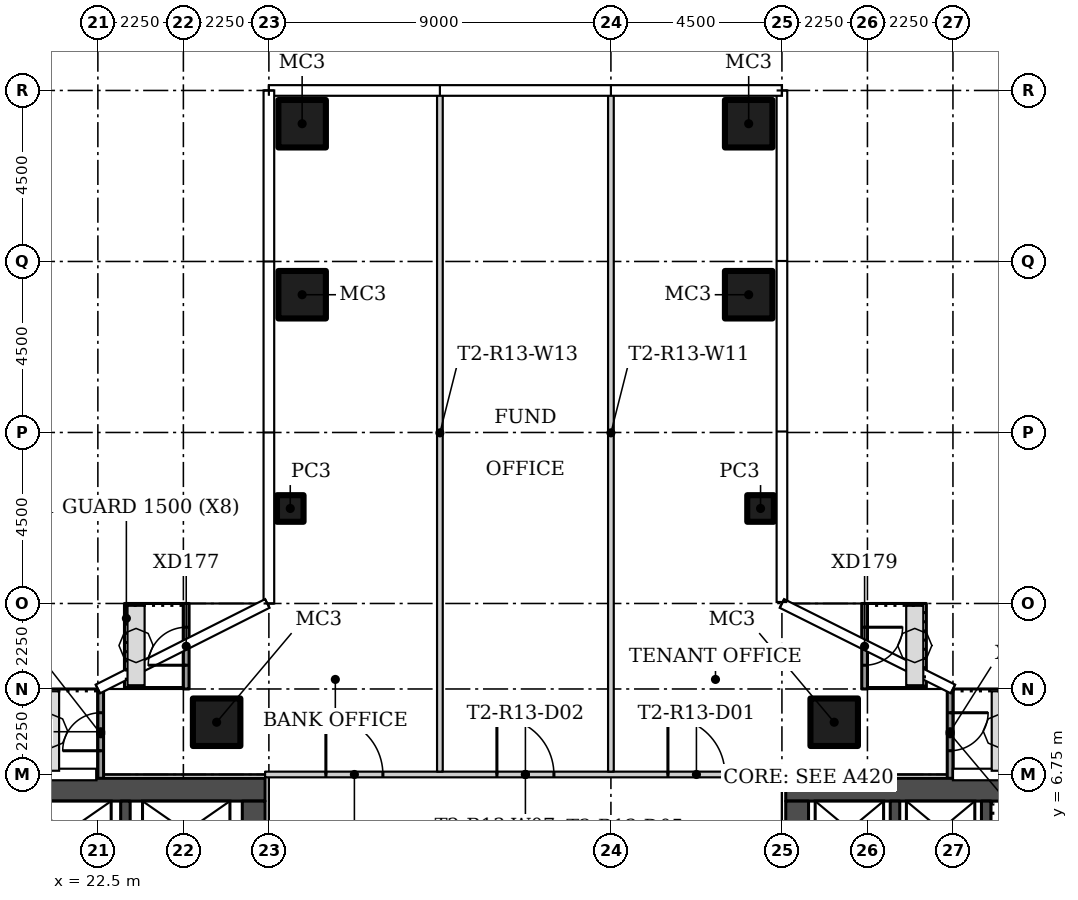
"""IFC4 building model, lengths in metres.
Left out: names, types, materials, properties, quantities, classifications, styles, units other than length and angle.
Written with IfcOpenShell. Run it as: python <this file> out.ifc"""

import sys

from ifc_helpers import new_model, si_unit, direction, frame, frame_2d, origin, origin_2d, place, context, subcontext, project, spatial, rectangle, hollow_rectangle, extrude, element, fill, save


model = new_model("IFC4")
c1 = context("Model", 3, precision=1e-05, world=origin(), true_north=direction((0.0, 1.0)))
c2 = subcontext(c1, "Body", "Model", "MODEL_VIEW")
j1 = project(units=[si_unit("LENGTHUNIT", "METRE"), si_unit("PLANEANGLEUNIT", "RADIAN")], contexts=[c1])
p1 = place(None, origin())
s1 = spatial("IfcSite", under=j1, at=p1, CompositionType="ELEMENT")
p2 = place(p1, origin())
s2 = spatial("IfcBuilding", under=s1, at=p2, CompositionType="ELEMENT")
p3 = place(p2, frame((0.0, 0.0, 120.9)))
s3 = spatial("IfcBuildingStorey", under=s2, at=p3, CompositionType="ELEMENT", Elevation=120.9)
for number, where in (
    (1, (25.625, 8.125, 0.0)),
    (2, (41.875, 8.125, 0.0)),
):
    element("IfcColumn", number, at=place(p3, frame(where)), inside=s3, PredefinedType="COLUMN", context=c2, shape_type="SweptSolid", body=[
        extrude(hollow_rectangle(XDim=1.25, YDim=1.25, WallThickness=0.05, at=origin_2d()), origin(), (0.0, 0.0, 1.0), 3.55),
    ])
p4 = place(p3, frame((39.938, 13.75, 0.0)))
e3 = element("IfcColumn", 3, at=p4, inside=s3, PredefinedType="COLUMN", context=c2, shape_type="SweptSolid", body=[
    extrude(hollow_rectangle(XDim=0.7, YDim=0.7, WallThickness=0.025, at=origin_2d()), origin(), (0.0, 0.0, 1.0), 3.55),
])
for number, where in (
    (4, (39.625, 19.375, 0.0)),
    (5, (39.625, 23.875, 0.0)),
):
    element("IfcColumn", number, at=place(p3, frame(where)), inside=s3, PredefinedType="COLUMN", context=c2, shape_type="SweptSolid", body=[
        extrude(hollow_rectangle(XDim=1.25, YDim=1.25, WallThickness=0.05, at=origin_2d()), origin(), (0.0, 0.0, 1.0), 3.55),
    ])
p5 = place(p3, frame((27.562, 13.75, 0.0)))
e6 = element("IfcColumn", 6, at=p5, inside=s3, PredefinedType="COLUMN", context=c2, shape_type="SweptSolid", body=[
    extrude(hollow_rectangle(XDim=0.7, YDim=0.7, WallThickness=0.025, at=origin_2d()), origin(), (0.0, 0.0, 1.0), 3.55),
])
for number, where in (
    (7, (27.875, 19.375, 0.0)),
    (8, (27.875, 23.875, 0.0)),
):
    element("IfcColumn", number, at=place(p3, frame(where)), inside=s3, PredefinedType="COLUMN", context=c2, shape_type="SweptSolid", body=[
        extrude(hollow_rectangle(XDim=1.25, YDim=1.25, WallThickness=0.05, at=origin_2d()), origin(), (0.0, 0.0, 1.0), 3.55),
    ])
p6 = place(p3, frame((26.9, 6.75, 0.0)))
e9 = element("IfcWall", 9, at=p6, inside=s3, PredefinedType="PARTITIONING", context=c2, shape_type="SweptSolid", body=[
    extrude(rectangle(XDim=13.7, YDim=0.15, at=frame_2d((6.85, 0.0))), origin(), (0.0, 0.0, 1.0), 3.55),
])
p7 = place(p6, frame((10.6, 0.0, 0.0)))
e10 = element("IfcOpeningElement", 10, at=p7, cuts=e9, PredefinedType="OPENING", context=c2, shape_type="SweptSolid", body=[
    extrude(rectangle(XDim=1.5, YDim=2.1, at=frame_2d((0.75, 1.05))), frame((0.0, 0.085, 0.0), z_axis=(0.0, -1.0, 0.0), x_axis=(1.0, 0.0, 0.0)), (0.0, 0.0, 1.0), 0.17),
])
p8 = place(p6, frame((6.1, 0.0, 0.0)))
e11 = element("IfcOpeningElement", 11, at=p8, cuts=e9, PredefinedType="OPENING", context=c2, shape_type="SweptSolid", body=[
    extrude(rectangle(XDim=1.5, YDim=2.1, at=frame_2d((0.75, 1.05))), frame((0.0, 0.085, 0.0), z_axis=(0.0, -1.0, 0.0), x_axis=(1.0, 0.0, 0.0)), (0.0, 0.0, 1.0), 0.17),
])
p9 = place(p6, frame((1.6, 0.0, 0.0)))
e12 = element("IfcOpeningElement", 12, at=p9, cuts=e9, PredefinedType="OPENING", context=c2, shape_type="SweptSolid", body=[
    extrude(rectangle(XDim=1.5, YDim=2.1, at=frame_2d((0.75, 1.05))), frame((0.0, 0.085, 0.0), z_axis=(0.0, -1.0, 0.0), x_axis=(1.0, 0.0, 0.0)), (0.0, 0.0, 1.0), 0.17),
])
for number, where, z_axis, x_axis in (
    (13, (36.0, 24.655, 0.0), (0.0, 0.0, 1.0), (0.0, -1.0, 0.0)),
    (14, (31.5, 24.655, 0.0), (0.0, 0.0, 1.0), (0.0, -1.0, 0.0)),
):
    element("IfcWall", number, at=place(p3, frame(where, z_axis=z_axis, x_axis=x_axis)), inside=s3, PredefinedType="PARTITIONING", context=c2, shape_type="SweptSolid", body=[
        extrude(rectangle(XDim=17.83, YDim=0.15, at=frame_2d((8.915, 0.0))), origin(), (0.0, 0.0, 1.0), 3.55),
    ])
p10 = place(p3, frame((24.825, 9.0, 0.0), z_axis=(0.0, 0.0, 1.0), x_axis=(0.0, 1.0, 0.0)))
e15 = element("IfcWall", 15, at=p10, inside=s3, PredefinedType="SOLIDWALL", context=c2, shape_type="SweptSolid", body=[
    extrude(rectangle(XDim=2.25, YDim=0.15, at=frame_2d((1.125, 0.0))), origin(), (0.0, 0.0, 1.0), 3.45),
])
p11 = place(p10, frame((0.625, 0.0, 0.0)))
e16 = element("IfcOpeningElement", 16, at=p11, cuts=e15, PredefinedType="OPENING", context=c2, shape_type="SweptSolid", body=[
    extrude(rectangle(XDim=1.0, YDim=2.4, at=frame_2d((0.5, 1.2))), frame((0.0, 0.085, 0.0), z_axis=(0.0, -1.0, 0.0), x_axis=(1.0, 0.0, 0.0)), (0.0, 0.0, 1.0), 0.17),
])
p12 = place(p3, frame((22.575, 6.643, 0.0), z_axis=(0.0, 0.0, 1.0), x_axis=(0.0, 1.0, 0.0)))
e17 = element("IfcWall", 17, at=p12, inside=s3, PredefinedType="SOLIDWALL", context=c2, shape_type="SweptSolid", body=[
    extrude(rectangle(XDim=2.357, YDim=0.15, at=frame_2d((1.178, 0.0))), origin(), (0.0, 0.0, 1.0), 3.45),
])
p13 = place(p12, frame((0.732, 0.0, 0.0)))
e18 = element("IfcOpeningElement", 18, at=p13, cuts=e17, PredefinedType="OPENING", context=c2, shape_type="SweptSolid", body=[
    extrude(rectangle(XDim=1.0, YDim=2.4, at=frame_2d((0.5, 1.2))), frame((0.0, 0.085, 0.0), z_axis=(0.0, -1.0, 0.0), x_axis=(1.0, 0.0, 0.0)), (0.0, 0.0, 1.0), 0.17),
])
p14 = place(p3, frame((42.675, 11.25, 0.0), z_axis=(0.0, 0.0, 1.0), x_axis=(0.0, -1.0, 0.0)))
e19 = element("IfcWall", 19, at=p14, inside=s3, PredefinedType="SOLIDWALL", context=c2, shape_type="SweptSolid", body=[
    extrude(rectangle(XDim=2.25, YDim=0.15, at=frame_2d((1.125, 0.0))), origin(), (0.0, 0.0, 1.0), 3.45),
])
p15 = place(p14, frame((0.625, 0.0, 0.0)))
e20 = element("IfcOpeningElement", 20, at=p15, cuts=e19, PredefinedType="OPENING", context=c2, shape_type="SweptSolid", body=[
    extrude(rectangle(XDim=1.0, YDim=2.4, at=frame_2d((0.5, 1.2))), frame((0.0, 0.085, 0.0), z_axis=(0.0, -1.0, 0.0), x_axis=(1.0, 0.0, 0.0)), (0.0, 0.0, 1.0), 0.17),
])
p16 = place(p3, frame((44.925, 9.0, 0.0), z_axis=(0.0, 0.0, 1.0), x_axis=(0.0, -1.0, 0.0)))
e21 = element("IfcWall", 21, at=p16, inside=s3, PredefinedType="SOLIDWALL", context=c2, shape_type="SweptSolid", body=[
    extrude(rectangle(XDim=2.357, YDim=0.15, at=frame_2d((1.178, 0.0))), origin(), (0.0, 0.0, 1.0), 3.45),
])
p17 = place(p16, frame((0.625, 0.0, 0.0)))
e22 = element("IfcOpeningElement", 22, at=p17, cuts=e21, PredefinedType="OPENING", context=c2, shape_type="SweptSolid", body=[
    extrude(rectangle(XDim=1.0, YDim=2.4, at=frame_2d((0.5, 1.2))), frame((0.0, 0.085, 0.0), z_axis=(0.0, -1.0, 0.0), x_axis=(1.0, 0.0, 0.0)), (0.0, 0.0, 1.0), 0.17),
])
p18 = place(p3, frame((13.6, 6.35, 0.0)))
e23 = element("IfcWall", 23, at=p18, inside=s3, PredefinedType="SHEAR", context=c2, shape_type="SweptSolid", body=[
    extrude(rectangle(XDim=13.3, YDim=0.6, at=frame_2d((6.65, 0.0))), origin(), (0.0, 0.0, 1.0), 3.55),
])
p19 = place(p3, frame((26.6, 6.05, 0.0), z_axis=(0.0, 0.0, 1.0), x_axis=(0.0, -1.0, 0.0)))
e24 = element("IfcWall", 24, at=p19, inside=s3, PredefinedType="SHEAR", context=c2, shape_type="SweptSolid", body=[
    extrude(rectangle(XDim=12.1, YDim=0.6, at=frame_2d((6.05, 0.0))), origin(), (0.0, 0.0, 1.0), 3.55),
])
p20 = place(p19, frame((10.1, 0.0, 0.0)))
e25 = element("IfcOpeningElement", 25, at=p20, cuts=e24, PredefinedType="OPENING", context=c2, shape_type="SweptSolid", body=[
    extrude(rectangle(XDim=1.2, YDim=2.1, at=frame_2d((0.6, 1.05))), frame((0.0, 0.31, 0.0), z_axis=(0.0, -1.0, 0.0), x_axis=(1.0, 0.0, 0.0)), (0.0, 0.0, 1.0), 0.62),
])
p21 = place(p19, frame((3.9, 0.0, 0.0)))
e26 = element("IfcOpeningElement", 26, at=p21, cuts=e24, PredefinedType="OPENING", context=c2, shape_type="SweptSolid", body=[
    extrude(rectangle(XDim=1.8, YDim=2.4, at=frame_2d((0.9, 1.2))), frame((0.0, 0.31, 0.0), z_axis=(0.0, -1.0, 0.0), x_axis=(1.0, 0.0, 0.0)), (0.0, 0.0, 1.0), 0.62),
])
p22 = place(p3, frame((23.225, 3.25, 0.0), z_axis=(0.0, 0.0, 1.0), x_axis=(0.0, 1.0, 0.0)))
e27 = element("IfcWall", 27, at=p22, inside=s3, PredefinedType="SHEAR", context=c2, shape_type="SweptSolid", body=[
    extrude(rectangle(XDim=2.8, YDim=0.25, at=frame_2d((1.4, 0.0))), origin(), (0.0, 0.0, 1.0), 3.55),
])
p23 = place(p3, frame((53.9, 6.35, 0.0), z_axis=(0.0, 0.0, 1.0), x_axis=(-1.0, 0.0, 0.0)))
e28 = element("IfcWall", 28, at=p23, inside=s3, PredefinedType="SHEAR", context=c2, shape_type="SweptSolid", body=[
    extrude(rectangle(XDim=13.3, YDim=0.6, at=frame_2d((6.65, 0.0))), origin(), (0.0, 0.0, 1.0), 3.55),
])
p24 = place(p3, frame((40.9, -6.05, 0.0), z_axis=(0.0, 0.0, 1.0), x_axis=(0.0, 1.0, 0.0)))
e29 = element("IfcWall", 29, at=p24, inside=s3, PredefinedType="SHEAR", context=c2, shape_type="SweptSolid", body=[
    extrude(rectangle(XDim=12.1, YDim=0.6, at=frame_2d((6.05, 0.0))), origin(), (0.0, 0.0, 1.0), 3.55),
])
p25 = place(p24, frame((0.8, 0.0, 0.0)))
e30 = element("IfcOpeningElement", 30, at=p25, cuts=e29, PredefinedType="OPENING", context=c2, shape_type="SweptSolid", body=[
    extrude(rectangle(XDim=1.2, YDim=2.1, at=frame_2d((0.6, 1.05))), frame((0.0, 0.31, 0.0), z_axis=(0.0, -1.0, 0.0), x_axis=(1.0, 0.0, 0.0)), (0.0, 0.0, 1.0), 0.62),
])
p26 = place(p24, frame((6.4, 0.0, 0.0)))
e31 = element("IfcOpeningElement", 31, at=p26, cuts=e29, PredefinedType="OPENING", context=c2, shape_type="SweptSolid", body=[
    extrude(rectangle(XDim=1.8, YDim=2.4, at=frame_2d((0.9, 1.2))), frame((0.0, 0.31, 0.0), z_axis=(0.0, -1.0, 0.0), x_axis=(1.0, 0.0, 0.0)), (0.0, 0.0, 1.0), 0.62),
])
for number, where, z_axis, x_axis in (
    (32, (45.875, 3.25, 0.0), (0.0, 0.0, 1.0), (0.0, 1.0, 0.0)),
    (33, (43.475, 3.25, 0.0), (0.0, 0.0, 1.0), (0.0, 1.0, 0.0)),
):
    element("IfcWall", number, at=place(p3, frame(where, z_axis=z_axis, x_axis=x_axis)), inside=s3, PredefinedType="SHEAR", context=c2, shape_type="SweptSolid", body=[
        extrude(rectangle(XDim=2.8, YDim=0.25, at=frame_2d((1.4, 0.0))), origin(), (0.0, 0.0, 1.0), 3.55),
    ])
p27 = place(p7, origin())
e34 = element("IfcDoor", 34, at=p27, inside=s3, OperationType="DOUBLE_DOOR_SINGLE_SWING", PredefinedType="DOOR", context=c2, shape_type="SweptSolid", body=[
    extrude(rectangle(XDim=1.5, YDim=2.1, at=frame_2d((0.75, 1.05))), frame((0.0, 0.025, 0.0), z_axis=(0.0, -1.0, 0.0), x_axis=(1.0, 0.0, 0.0)), (0.0, 0.0, 1.0), 0.05),
])
fill(e10, e34)
p28 = place(p8, origin())
e35 = element("IfcDoor", 35, at=p28, inside=s3, OperationType="DOUBLE_DOOR_SINGLE_SWING", PredefinedType="DOOR", context=c2, shape_type="SweptSolid", body=[
    extrude(rectangle(XDim=1.5, YDim=2.1, at=frame_2d((0.75, 1.05))), frame((0.0, 0.025, 0.0), z_axis=(0.0, -1.0, 0.0), x_axis=(1.0, 0.0, 0.0)), (0.0, 0.0, 1.0), 0.05),
])
fill(e11, e35)
p29 = place(p9, origin())
e36 = element("IfcDoor", 36, at=p29, inside=s3, OperationType="DOUBLE_DOOR_SINGLE_SWING", PredefinedType="DOOR", context=c2, shape_type="SweptSolid", body=[
    extrude(rectangle(XDim=1.5, YDim=2.1, at=frame_2d((0.75, 1.05))), frame((0.0, 0.025, 0.0), z_axis=(0.0, -1.0, 0.0), x_axis=(1.0, 0.0, 0.0)), (0.0, 0.0, 1.0), 0.05),
])
fill(e12, e36)
p30 = place(p11, origin())
e37 = element("IfcDoor", 37, at=p30, inside=s3, OperationType="SINGLE_SWING_RIGHT", PredefinedType="DOOR", context=c2, shape_type="SweptSolid", body=[
    extrude(rectangle(XDim=1.0, YDim=2.4, at=frame_2d((0.5, 1.2))), frame((0.0, 0.025, 0.0), z_axis=(0.0, -1.0, 0.0), x_axis=(1.0, 0.0, 0.0)), (0.0, 0.0, 1.0), 0.05),
])
fill(e16, e37)
p31 = place(p13, origin())
e38 = element("IfcDoor", 38, at=p31, inside=s3, OperationType="SINGLE_SWING_LEFT", PredefinedType="DOOR", context=c2, shape_type="SweptSolid", body=[
    extrude(rectangle(XDim=1.0, YDim=2.4, at=frame_2d((0.5, 1.2))), frame((0.0, 0.025, 0.0), z_axis=(0.0, -1.0, 0.0), x_axis=(1.0, 0.0, 0.0)), (0.0, 0.0, 1.0), 0.05),
])
fill(e18, e38)
p32 = place(p15, origin())
e39 = element("IfcDoor", 39, at=p32, inside=s3, OperationType="SINGLE_SWING_RIGHT", PredefinedType="DOOR", context=c2, shape_type="SweptSolid", body=[
    extrude(rectangle(XDim=1.0, YDim=2.4, at=frame_2d((0.5, 1.2))), frame((0.0, 0.025, 0.0), z_axis=(0.0, -1.0, 0.0), x_axis=(1.0, 0.0, 0.0)), (0.0, 0.0, 1.0), 0.05),
])
fill(e20, e39)
p33 = place(p17, origin())
e40 = element("IfcDoor", 40, at=p33, inside=s3, OperationType="SINGLE_SWING_LEFT", PredefinedType="DOOR", context=c2, shape_type="SweptSolid", body=[
    extrude(rectangle(XDim=1.0, YDim=2.4, at=frame_2d((0.5, 1.2))), frame((0.0, 0.025, 0.0), z_axis=(0.0, -1.0, 0.0), x_axis=(1.0, 0.0, 0.0)), (0.0, 0.0, 1.0), 0.05),
])
fill(e22, e40)
save(model, sys.argv[1])
